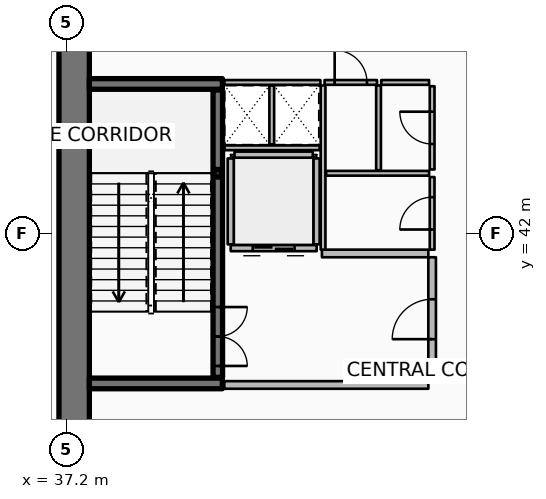
"""IFC4 building model, lengths in metres.
Left out: names, types, materials, properties, quantities, classifications, styles, units other than length and angle.
Written with IfcOpenShell. Run it as: python <this file> out.ifc"""

import sys

from ifc_helpers import new_model, si_unit, direction, frame, frame_2d, origin, origin_2d, place, context, subcontext, project, spatial, rectangle, hollow_rectangle, extrude, element, fill, save


model = new_model("IFC4")
c1 = context("Model", 3, precision=1e-05, world=origin(), true_north=direction((0.0, 1.0)))
c2 = subcontext(c1, "Body", "Model", "MODEL_VIEW")
j1 = project(units=[si_unit("LENGTHUNIT", "METRE"), si_unit("PLANEANGLEUNIT", "RADIAN")], contexts=[c1])
p1 = place(None, origin())
s1 = spatial("IfcSite", under=j1, at=p1, CompositionType="ELEMENT")
p2 = place(p1, origin())
s2 = spatial("IfcBuilding", under=s1, at=p2, CompositionType="ELEMENT")
p3 = place(p2, frame((0.0, 0.0, 123.0)))
s3 = spatial("IfcBuildingStorey", under=s2, at=p3, CompositionType="ELEMENT", Elevation=123.0)
p4 = place(p3, frame((37.4, 34.0, 0.0), z_axis=(0.0, 0.0, 1.0), x_axis=(0.0, 1.0, 0.0)))
e1 = element("IfcWall", 1, at=p4, inside=s3, PredefinedType="SHEAR", context=c2, shape_type="SweptSolid", body=[
    extrude(rectangle(XDim=16.0, YDim=0.8, at=frame_2d((8.0, 0.0))), origin(), (0.0, 0.0, 1.0), 4.8),
])
for number, where, z_axis, x_axis in (
    (2, (37.8, 38.06, 0.0), (0.0, 0.0, 1.0), (1.0, 0.0, 0.0)),
    (3, (37.8, 45.94, 0.0), (0.0, 0.0, 1.0), (1.0, 0.0, 0.0)),
):
    element("IfcWall", number, at=place(p3, frame(where, z_axis=z_axis, x_axis=x_axis)), inside=s3, PredefinedType="SHEAR", context=c2, shape_type="SweptSolid", body=[
        extrude(rectangle(XDim=3.5, YDim=0.28, at=frame_2d((1.75, 0.0))), origin(), (0.0, 0.0, 1.0), 4.8),
    ])
p5 = place(p3, frame((41.18, 43.59, 0.0), z_axis=(0.0, 0.0, 1.0), x_axis=(1.0, 0.0, 0.0)))
e4 = element("IfcColumn", 4, at=p5, inside=s3, PredefinedType="COLUMN", context=c2, shape_type="SweptSolid", body=[
    extrude(hollow_rectangle(XDim=0.2, YDim=0.2, WallThickness=0.01, InnerFilletRadius=0.01, OuterFilletRadius=0.02, at=origin_2d()), origin(), (0.0, 0.0, 1.0), 2.195),
])
p6 = place(p3, frame((41.18, 38.22, 0.0), z_axis=(0.0, 0.0, 1.0), x_axis=(0.0, 1.0, 0.0)))
e5 = element("IfcWall", 5, at=p6, inside=s3, PredefinedType="SOLIDWALL", context=c2, shape_type="SweptSolid", body=[
    extrude(rectangle(XDim=7.56, YDim=0.25, at=frame_2d((3.78, 0.0))), origin(), (0.0, 0.0, 1.0), 4.4),
])
p7 = place(p6, frame((0.3, 0.0, 0.0)))
e6 = element("IfcOpeningElement", 6, at=p7, cuts=e5, PredefinedType="OPENING", context=c2, shape_type="SweptSolid", body=[
    extrude(rectangle(XDim=1.55, YDim=2.15, at=frame_2d((0.775, 1.075))), frame((0.0, 0.135, 0.0), z_axis=(0.0, -1.0, 0.0), x_axis=(1.0, 0.0, 0.0)), (0.0, 0.0, 1.0), 0.27),
])
p8 = place(p3, frame((43.78, 41.62, 0.0), z_axis=(0.0, 0.0, 1.0), x_axis=(-1.0, 0.0, 0.0)))
e7 = element("IfcWall", 7, at=p8, inside=s3, PredefinedType="PARTITIONING", context=c2, shape_type="SweptSolid", body=[
    extrude(rectangle(XDim=2.26, YDim=0.16, at=frame_2d((1.13, 0.0))), origin(), (0.0, 0.0, 1.0), 4.4),
])
p9 = place(p8, frame((0.58, 0.0, 0.0)))
e8 = element("IfcOpeningElement", 8, at=p9, cuts=e7, PredefinedType="OPENING", context=c2, shape_type="SweptSolid", body=[
    extrude(rectangle(XDim=1.1, YDim=2.1, at=frame_2d((0.55, 1.05))), frame((0.0, 0.09, 0.0), z_axis=(0.0, -1.0, 0.0), x_axis=(1.0, 0.0, 0.0)), (0.0, 0.0, 1.0), 0.18),
])
for number, where, z_axis, x_axis in (
    (9, (43.78, 41.72, 0.0), (0.0, 0.0, 1.0), (0.0, 1.0, 0.0)),
    (10, (41.52, 41.72, 0.0), (0.0, 0.0, 1.0), (0.0, 1.0, 0.0)),
):
    element("IfcWall", number, at=place(p3, frame(where, z_axis=z_axis, x_axis=x_axis)), inside=s3, PredefinedType="PARTITIONING", context=c2, shape_type="SweptSolid", body=[
        extrude(rectangle(XDim=2.26, YDim=0.16, at=frame_2d((1.13, 0.0))), origin(), (0.0, 0.0, 1.0), 4.4),
    ])
p10 = place(p3, frame((41.62, 44.08, 0.0), z_axis=(0.0, 0.0, 1.0), x_axis=(1.0, 0.0, 0.0)))
e11 = element("IfcWall", 11, at=p10, inside=s3, PredefinedType="PARTITIONING", context=c2, shape_type="SweptSolid", body=[
    extrude(rectangle(XDim=2.06, YDim=0.16, at=frame_2d((1.03, 0.0))), origin(), (0.0, 0.0, 1.0), 4.4),
])
p11 = place(p3, frame((41.35, 38.02, 0.0), z_axis=(0.0, 0.0, 1.0), x_axis=(1.0, 0.0, 0.0)))
e12 = element("IfcWall", 12, at=p11, inside=s3, PredefinedType="PARTITIONING", context=c2, shape_type="SweptSolid", body=[
    extrude(rectangle(XDim=5.37, YDim=0.2, at=frame_2d((2.685, 0.0))), origin(), (0.0, 0.0, 1.0), 4.4),
])
p12 = place(p3, frame((43.92, 41.48, 0.0), z_axis=(0.0, 0.0, 1.0), x_axis=(1.0, 0.0, 0.0)))
e13 = element("IfcWall", 13, at=p12, inside=s3, PredefinedType="PARTITIONING", context=c2, shape_type="SweptSolid", body=[
    extrude(rectangle(XDim=2.8, YDim=0.2, at=frame_2d((1.4, 0.0))), origin(), (0.0, 0.0, 1.0), 4.4),
])
p13 = place(p3, frame((46.82, 38.12, 0.0), z_axis=(0.0, 0.0, 1.0), x_axis=(0.0, 1.0, 0.0)))
e14 = element("IfcWall", 14, at=p13, inside=s3, PredefinedType="PARTITIONING", context=c2, shape_type="SweptSolid", body=[
    extrude(rectangle(XDim=3.26, YDim=0.2, at=frame_2d((1.63, 0.0))), origin(), (0.0, 0.0, 1.0), 4.4),
])
p14 = place(p13, frame((1.105, 0.0, 0.0)))
e15 = element("IfcOpeningElement", 15, at=p14, cuts=e14, PredefinedType="OPENING", context=c2, shape_type="SweptSolid", body=[
    extrude(rectangle(XDim=1.05, YDim=2.1, at=frame_2d((0.525, 1.05))), frame((0.0, 0.11, 0.0), z_axis=(0.0, -1.0, 0.0), x_axis=(1.0, 0.0, 0.0)), (0.0, 0.0, 1.0), 0.22),
])
p15 = place(p3, frame((41.36, 44.26, 0.0), z_axis=(0.0, 0.0, 1.0), x_axis=(1.0, 0.0, 0.0)))
e16 = element("IfcWall", 16, at=p15, inside=s3, PredefinedType="PARTITIONING", context=c2, shape_type="SweptSolid", body=[
    extrude(rectangle(XDim=2.5, YDim=0.125, at=frame_2d((1.25, 0.0))), origin(), (0.0, 0.0, 1.0), 3.84),
])
p16 = place(p3, frame((42.6, 44.35, 0.0), z_axis=(0.0, 0.0, 1.0), x_axis=(0.0, 1.0, 0.0)))
e17 = element("IfcWall", 17, at=p16, inside=s3, PredefinedType="PARTITIONING", context=c2, shape_type="SweptSolid", body=[
    extrude(rectangle(XDim=1.55, YDim=0.125, at=frame_2d((0.775, 0.0))), origin(), (0.0, 0.0, 1.0), 3.84),
])
p17 = place(p3, frame((43.95, 41.58, 0.0), z_axis=(0.0, 0.0, 1.0), x_axis=(0.0, 1.0, 0.0)))
e18 = element("IfcWall", 18, at=p17, inside=s3, PredefinedType="PARTITIONING", context=c2, shape_type="SweptSolid", body=[
    extrude(rectangle(XDim=4.32, YDim=0.125, at=frame_2d((2.16, 0.0))), origin(), (0.0, 0.0, 1.0), 3.84),
])
p18 = place(p3, frame((44.03, 43.59, 0.0), z_axis=(0.0, 0.0, 1.0), x_axis=(1.0, 0.0, 0.0)))
e19 = element("IfcWall", 19, at=p18, inside=s3, PredefinedType="PARTITIONING", context=c2, shape_type="SweptSolid", body=[
    extrude(rectangle(XDim=2.71, YDim=0.125, at=frame_2d((1.355, 0.0))), origin(), (0.0, 0.0, 1.0), 3.84),
])
p19 = place(p3, frame((45.41, 43.67, 0.0), z_axis=(0.0, 0.0, 1.0), x_axis=(0.0, 1.0, 0.0)))
e20 = element("IfcWall", 20, at=p19, inside=s3, PredefinedType="PARTITIONING", context=c2, shape_type="SweptSolid", body=[
    extrude(rectangle(XDim=2.23, YDim=0.125, at=frame_2d((1.115, 0.0))), origin(), (0.0, 0.0, 1.0), 3.84),
])
p20 = place(p3, frame((46.82, 41.58, 0.0), z_axis=(0.0, 0.0, 1.0), x_axis=(0.0, 1.0, 0.0)))
e21 = element("IfcWall", 21, at=p20, inside=s3, PredefinedType="PARTITIONING", context=c2, shape_type="SweptSolid", body=[
    extrude(rectangle(XDim=1.91, YDim=0.125, at=frame_2d((0.955, 0.0))), origin(), (0.0, 0.0, 1.0), 3.84),
])
p21 = place(p20, frame((0.53, 0.0, 0.0)))
e22 = element("IfcOpeningElement", 22, at=p21, cuts=e21, PredefinedType="OPENING", context=c2, shape_type="SweptSolid", body=[
    extrude(rectangle(XDim=0.85, YDim=2.06, at=frame_2d((0.425, 1.03))), frame((0.0, 0.073, 0.0), z_axis=(0.0, -1.0, 0.0), x_axis=(1.0, 0.0, 0.0)), (0.0, 0.0, 1.0), 0.145),
])
p22 = place(p3, frame((46.82, 43.69, 0.0), z_axis=(0.0, 0.0, 1.0), x_axis=(0.0, 1.0, 0.0)))
e23 = element("IfcWall", 23, at=p22, inside=s3, PredefinedType="PARTITIONING", context=c2, shape_type="SweptSolid", body=[
    extrude(rectangle(XDim=2.19, YDim=0.125, at=frame_2d((1.095, 0.0))), origin(), (0.0, 0.0, 1.0), 3.84),
])
p23 = place(p22, frame((0.67, 0.0, 0.0)))
e24 = element("IfcOpeningElement", 24, at=p23, cuts=e23, PredefinedType="OPENING", context=c2, shape_type="SweptSolid", body=[
    extrude(rectangle(XDim=0.85, YDim=2.06, at=frame_2d((0.425, 1.03))), frame((0.0, 0.073, 0.0), z_axis=(0.0, -1.0, 0.0), x_axis=(1.0, 0.0, 0.0)), (0.0, 0.0, 1.0), 0.145),
])
p24 = place(p3, frame((41.35, 45.98, 0.0), z_axis=(0.0, 0.0, 1.0), x_axis=(1.0, 0.0, 0.0)))
e25 = element("IfcWall", 25, at=p24, inside=s3, PredefinedType="PARTITIONING", context=c2, shape_type="SweptSolid", body=[
    extrude(rectangle(XDim=2.53, YDim=0.125, at=frame_2d((1.265, 0.0))), origin(), (0.0, 0.0, 1.0), 3.84),
])
p25 = place(p3, frame((43.99, 45.98, 0.0), z_axis=(0.0, 0.0, 1.0), x_axis=(1.0, 0.0, 0.0)))
e26 = element("IfcWall", 26, at=p25, inside=s3, PredefinedType="PARTITIONING", context=c2, shape_type="SweptSolid", body=[
    extrude(rectangle(XDim=1.38, YDim=0.125, at=frame_2d((0.69, 0.0))), origin(), (0.0, 0.0, 1.0), 3.84),
])
p26 = place(p25, frame((0.265, 0.0, 0.0)))
e27 = element("IfcOpeningElement", 27, at=p26, cuts=e26, PredefinedType="OPENING", context=c2, shape_type="SweptSolid", body=[
    extrude(rectangle(XDim=0.85, YDim=2.06, at=frame_2d((0.425, 1.03))), frame((0.0, 0.073, 0.0), z_axis=(0.0, -1.0, 0.0), x_axis=(1.0, 0.0, 0.0)), (0.0, 0.0, 1.0), 0.145),
])
p27 = place(p3, frame((45.48, 45.98, 0.0), z_axis=(0.0, 0.0, 1.0), x_axis=(1.0, 0.0, 0.0)))
e28 = element("IfcWall", 28, at=p27, inside=s3, PredefinedType="PARTITIONING", context=c2, shape_type="SweptSolid", body=[
    extrude(rectangle(XDim=1.26, YDim=0.125, at=frame_2d((0.63, 0.0))), origin(), (0.0, 0.0, 1.0), 3.84),
])
p28 = place(p7, origin())
e29 = element("IfcDoor", 29, at=p28, inside=s3, OperationType="DOUBLE_DOOR_SINGLE_SWING", PredefinedType="DOOR", context=c2, shape_type="SweptSolid", body=[
    extrude(rectangle(XDim=1.55, YDim=2.15, at=frame_2d((0.775, 1.075))), frame((0.0, 0.025, 0.0), z_axis=(0.0, -1.0, 0.0), x_axis=(1.0, 0.0, 0.0)), (0.0, 0.0, 1.0), 0.05),
])
fill(e6, e29)
p29 = place(p9, origin())
e30 = element("IfcDoor", 30, at=p29, inside=s3, OperationType="DOUBLE_DOOR_SLIDING", PredefinedType="DOOR", context=c2, shape_type="SweptSolid", body=[
    extrude(rectangle(XDim=1.1, YDim=2.1, at=frame_2d((0.55, 1.05))), frame((0.0, 0.025, 0.0), z_axis=(0.0, -1.0, 0.0), x_axis=(1.0, 0.0, 0.0)), (0.0, 0.0, 1.0), 0.05),
])
fill(e8, e30)
p30 = place(p14, origin())
e31 = element("IfcDoor", 31, at=p30, inside=s3, OperationType="SINGLE_SWING_LEFT", PredefinedType="DOOR", context=c2, shape_type="SweptSolid", body=[
    extrude(rectangle(XDim=1.05, YDim=2.1, at=frame_2d((0.525, 1.05))), frame((0.0, 0.025, 0.0), z_axis=(0.0, -1.0, 0.0), x_axis=(1.0, 0.0, 0.0)), (0.0, 0.0, 1.0), 0.05),
])
fill(e15, e31)
p31 = place(p21, origin())
e32 = element("IfcDoor", 32, at=p31, inside=s3, OperationType="SINGLE_SWING_LEFT", PredefinedType="DOOR", context=c2, shape_type="SweptSolid", body=[
    extrude(rectangle(XDim=0.85, YDim=2.06, at=frame_2d((0.425, 1.03))), frame((0.0, 0.025, 0.0), z_axis=(0.0, -1.0, 0.0), x_axis=(1.0, 0.0, 0.0)), (0.0, 0.0, 1.0), 0.05),
])
fill(e22, e32)
p32 = place(p23, origin())
e33 = element("IfcDoor", 33, at=p32, inside=s3, OperationType="SINGLE_SWING_RIGHT", PredefinedType="DOOR", context=c2, shape_type="SweptSolid", body=[
    extrude(rectangle(XDim=0.85, YDim=2.06, at=frame_2d((0.425, 1.03))), frame((0.0, 0.025, 0.0), z_axis=(0.0, -1.0, 0.0), x_axis=(1.0, 0.0, 0.0)), (0.0, 0.0, 1.0), 0.05),
])
fill(e24, e33)
p33 = place(p26, origin())
e34 = element("IfcDoor", 34, at=p33, inside=s3, OperationType="SINGLE_SWING_LEFT", PredefinedType="DOOR", context=c2, shape_type="SweptSolid", body=[
    extrude(rectangle(XDim=0.85, YDim=2.06, at=frame_2d((0.425, 1.03))), frame((0.0, 0.025, 0.0), z_axis=(0.0, -1.0, 0.0), x_axis=(1.0, 0.0, 0.0)), (0.0, 0.0, 1.0), 0.05),
])
fill(e27, e34)
save(model, sys.argv[1])
